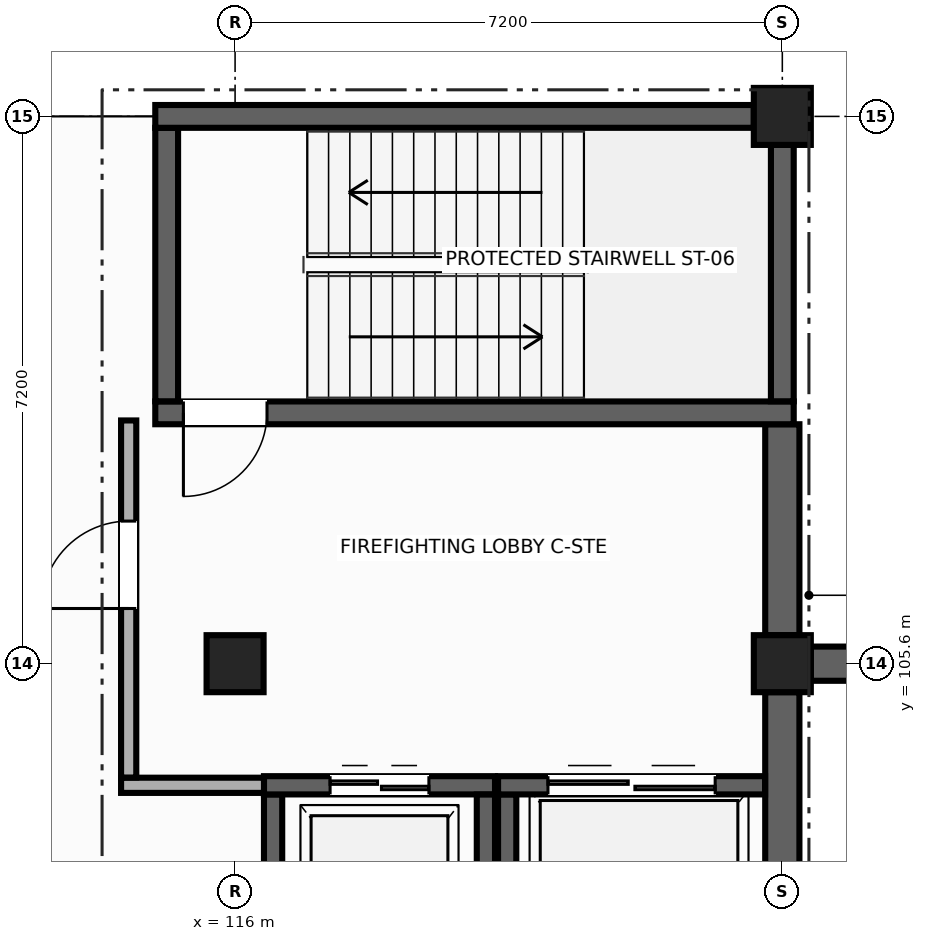
"""IFC4 building model, lengths in metres.
Left out: names, types, materials, properties, quantities, classifications, styles, units other than length and angle.
Written with IfcOpenShell. Run it as: python <this file> out.ifc"""

import sys

from ifc_helpers import new_model, si_unit, direction, frame, frame_2d, origin, origin_2d, place, context, subcontext, project, spatial, rectangle, extrude, element, fill, save


model = new_model("IFC4")
c1 = context("Model", 3, precision=1e-05, world=origin(), true_north=direction((0.0, 1.0)))
c2 = subcontext(c1, "Body", "Model", "MODEL_VIEW")
j1 = project(units=[si_unit("LENGTHUNIT", "METRE"), si_unit("PLANEANGLEUNIT", "RADIAN")], contexts=[c1])
p1 = place(None, origin())
s1 = spatial("IfcSite", under=j1, at=p1, CompositionType="ELEMENT")
p2 = place(p1, origin())
s2 = spatial("IfcBuilding", under=s1, at=p2, CompositionType="ELEMENT")
p3 = place(p2, frame((0.0, 0.0, -4.8)))
s3 = spatial("IfcBuildingStorey", under=s2, at=p3, CompositionType="ELEMENT", Elevation=-4.8)
p4 = place(p3, frame((116.0, 105.6, 0.0), z_axis=(0.0, 0.0, 1.0), x_axis=(0.0, 1.0, 0.0)))
e1 = element("IfcColumn", 1, at=p4, inside=s3, PredefinedType="COLUMN", context=c2, shape_type="SweptSolid", body=[
    extrude(rectangle(XDim=0.75, YDim=0.75, at=origin_2d()), origin(), (0.0, 0.0, 1.0), 4.42),
])
for number, where, z_axis, x_axis in (
    (2, (123.2, 105.6, 0.0), (0.0, 0.0, 1.0), (1.0, 0.0, 0.0)),
    (3, (123.2, 112.8, 0.0), (0.0, 0.0, 1.0), (1.0, 0.0, 0.0)),
):
    element("IfcColumn", number, at=place(p3, frame(where, z_axis=z_axis, x_axis=x_axis)), inside=s3, PredefinedType="COLUMN", context=c2, shape_type="SweptSolid", body=[
        extrude(rectangle(XDim=0.75, YDim=0.75, at=origin_2d()), origin(), (0.0, 0.0, 1.0), 4.8),
    ])
p5 = place(p3, frame((130.025, 105.6, 0.0), z_axis=(0.0, 0.0, 1.0), x_axis=(-1.0, 0.0, 0.0)))
e4 = element("IfcWall", 4, at=p5, inside=s3, PredefinedType="SHEAR", context=c2, shape_type="SweptSolid", body=[
    extrude(rectangle(XDim=6.45, YDim=0.45, at=frame_2d((3.225, 0.0))), origin(), (0.0, 0.0, 1.0), 4.55),
])
p6 = place(p3, frame((123.2, 105.225, 0.0), z_axis=(0.0, 0.0, 1.0), x_axis=(0.0, -1.0, 0.0)))
e5 = element("IfcWall", 5, at=p6, inside=s3, PredefinedType="SHEAR", context=c2, shape_type="SweptSolid", body=[
    extrude(rectangle(XDim=6.45, YDim=0.45, at=frame_2d((3.225, 0.0))), origin(), (0.0, 0.0, 1.0), 4.42),
])
p7 = place(p3, frame((123.2, 108.75, 0.0), z_axis=(0.0, 0.0, 1.0), x_axis=(0.0, -1.0, 0.0)))
e6 = element("IfcWall", 6, at=p7, inside=s3, PredefinedType="SHEAR", context=c2, shape_type="SweptSolid", body=[
    extrude(rectangle(XDim=2.775, YDim=0.45, at=frame_2d((1.387, 0.0))), origin(), (0.0, 0.0, 1.0), 4.42),
])
p8 = place(p3, frame((123.35, 108.9, 0.0), z_axis=(0.0, 0.0, 1.0), x_axis=(-1.0, 0.0, 0.0)))
e7 = element("IfcWall", 7, at=p8, inside=s3, PredefinedType="SHEAR", context=c2, shape_type="SweptSolid", body=[
    extrude(rectangle(XDim=8.4, YDim=0.3, at=frame_2d((4.2, 0.0))), origin(), (0.0, 0.0, 1.0), 4.42),
])
p9 = place(p8, frame((6.93, 0.0, 0.0)))
e8 = element("IfcOpeningElement", 8, at=p9, cuts=e7, PredefinedType="OPENING", context=c2, shape_type="SweptSolid", body=[
    extrude(rectangle(XDim=1.1, YDim=2.15, at=frame_2d((0.55, 1.075))), frame((0.0, 0.16, 0.0), z_axis=(0.0, -1.0, 0.0), x_axis=(1.0, 0.0, 0.0)), (0.0, 0.0, 1.0), 0.32),
])
p10 = place(p3, frame((115.1, 109.052, 0.0), z_axis=(0.0, 0.0, 1.0), x_axis=(0.0, 1.0, 0.0)))
e9 = element("IfcWall", 9, at=p10, inside=s3, PredefinedType="SHEAR", context=c2, shape_type="SweptSolid", body=[
    extrude(rectangle(XDim=3.598, YDim=0.3, at=frame_2d((1.799, 0.0))), origin(), (0.0, 0.0, 1.0), 4.42),
])
p11 = place(p3, frame((114.95, 112.8, 0.0), z_axis=(0.0, 0.0, 1.0), x_axis=(1.0, 0.0, 0.0)))
e10 = element("IfcWall", 10, at=p11, inside=s3, PredefinedType="SHEAR", context=c2, shape_type="SweptSolid", body=[
    extrude(rectangle(XDim=7.875, YDim=0.3, at=frame_2d((3.938, 0.0))), origin(), (0.0, 0.0, 1.0), 4.42),
])
p12 = place(p3, frame((123.2, 112.425, 0.0), z_axis=(0.0, 0.0, 1.0), x_axis=(0.0, -1.0, 0.0)))
e11 = element("IfcWall", 11, at=p12, inside=s3, PredefinedType="SHEAR", context=c2, shape_type="SweptSolid", body=[
    extrude(rectangle(XDim=3.373, YDim=0.3, at=frame_2d((1.687, 0.0))), origin(), (0.0, 0.0, 1.0), 4.42),
])
p13 = place(p3, frame((116.5, 100.922, 0.0), z_axis=(0.0, 0.0, 1.0), x_axis=(0.0, 1.0, 0.0)))
e12 = element("IfcWall", 12, at=p13, inside=s3, PredefinedType="SHEAR", context=c2, shape_type="SweptSolid", body=[
    extrude(rectangle(XDim=2.958, YDim=0.24, at=frame_2d((1.479, 0.0))), origin(), (0.0, 0.0, 1.0), 4.42),
])
p14 = place(p3, frame((116.38, 104.0, 0.0), z_axis=(0.0, 0.0, 1.0), x_axis=(1.0, 0.0, 0.0)))
e13 = element("IfcWall", 13, at=p14, inside=s3, PredefinedType="SHEAR", context=c2, shape_type="SweptSolid", body=[
    extrude(rectangle(XDim=3.04, YDim=0.24, at=frame_2d((1.52, 0.0))), origin(), (0.0, 0.0, 1.0), 4.42),
])
p15 = place(p14, frame((0.87, 0.0, 0.0)))
e14 = element("IfcOpeningElement", 14, at=p15, cuts=e13, PredefinedType="OPENING", context=c2, shape_type="SweptSolid", body=[
    extrude(rectangle(XDim=1.3, YDim=2.15, at=frame_2d((0.65, 1.075))), frame((0.0, 0.13, 0.0), z_axis=(0.0, -1.0, 0.0), x_axis=(1.0, 0.0, 0.0)), (0.0, 0.0, 1.0), 0.26),
])
p16 = place(p3, frame((119.3, 103.878, 0.0), z_axis=(0.0, 0.0, 1.0), x_axis=(0.0, -1.0, 0.0)))
e15 = element("IfcWall", 15, at=p16, inside=s3, PredefinedType="SHEAR", context=c2, shape_type="SweptSolid", body=[
    extrude(rectangle(XDim=2.956, YDim=0.24, at=frame_2d((1.478, 0.0))), origin(), (0.0, 0.0, 1.0), 4.42),
])
p17 = place(p3, frame((119.58, 100.322, 0.0), z_axis=(0.0, 0.0, 1.0), x_axis=(0.0, 1.0, 0.0)))
e16 = element("IfcWall", 16, at=p17, inside=s3, PredefinedType="SHEAR", context=c2, shape_type="SweptSolid", body=[
    extrude(rectangle(XDim=3.558, YDim=0.24, at=frame_2d((1.779, 0.0))), origin(), (0.0, 0.0, 1.0), 4.42),
])
p18 = place(p3, frame((119.46, 104.0, 0.0), z_axis=(0.0, 0.0, 1.0), x_axis=(1.0, 0.0, 0.0)))
e17 = element("IfcWall", 17, at=p18, inside=s3, PredefinedType="SHEAR", context=c2, shape_type="SweptSolid", body=[
    extrude(rectangle(XDim=3.513, YDim=0.24, at=frame_2d((1.756, 0.0))), origin(), (0.0, 0.0, 1.0), 4.42),
])
p19 = place(p18, frame((0.656, 0.0, 0.0)))
e18 = element("IfcOpeningElement", 18, at=p19, cuts=e17, PredefinedType="OPENING", context=c2, shape_type="SweptSolid", body=[
    extrude(rectangle(XDim=2.2, YDim=2.5, at=frame_2d((1.1, 1.25))), frame((0.0, 0.13, 0.0), z_axis=(0.0, -1.0, 0.0), x_axis=(1.0, 0.0, 0.0)), (0.0, 0.0, 1.0), 0.26),
])
p20 = place(p3, frame((116.38, 104.0, 0.0), z_axis=(0.0, 0.0, 1.0), x_axis=(-1.0, 0.0, 0.0)))
e19 = element("IfcWall", 19, at=p20, inside=s3, PredefinedType="PARTITIONING", context=c2, shape_type="SweptSolid", body=[
    extrude(rectangle(XDim=1.88, YDim=0.2, at=frame_2d((0.94, 0.0))), origin(), (0.0, 0.0, 1.0), 3.615),
])
p21 = place(p3, frame((114.6, 104.102, 0.0), z_axis=(0.0, 0.0, 1.0), x_axis=(0.0, 1.0, 0.0)))
e20 = element("IfcWall", 20, at=p21, inside=s3, PredefinedType="PARTITIONING", context=c2, shape_type="SweptSolid", body=[
    extrude(rectangle(XDim=4.698, YDim=0.2, at=frame_2d((2.349, 0.0))), origin(), (0.0, 0.0, 1.0), 3.015),
])
p22 = place(p21, frame((2.224, 0.0, 0.0)))
e21 = element("IfcOpeningElement", 21, at=p22, cuts=e20, PredefinedType="OPENING", context=c2, shape_type="SweptSolid", body=[
    extrude(rectangle(XDim=1.15, YDim=2.15, at=frame_2d((0.575, 1.075))), frame((0.0, 0.11, 0.0), z_axis=(0.0, -1.0, 0.0), x_axis=(1.0, 0.0, 0.0)), (0.0, 0.0, 1.0), 0.22),
])
p23 = place(p9, origin())
e22 = element("IfcDoor", 22, at=p23, inside=s3, OperationType="SINGLE_SWING_RIGHT", PredefinedType="DOOR", context=c2, shape_type="SweptSolid", body=[
    extrude(rectangle(XDim=1.1, YDim=2.15, at=frame_2d((0.55, 1.075))), frame((0.0, 0.025, 0.0), z_axis=(0.0, -1.0, 0.0), x_axis=(1.0, 0.0, 0.0)), (0.0, 0.0, 1.0), 0.05),
])
fill(e8, e22)
p24 = place(p15, origin())
e23 = element("IfcDoor", 23, at=p24, inside=s3, OperationType="DOUBLE_DOOR_SLIDING", PredefinedType="DOOR", context=c2, shape_type="SweptSolid", body=[
    extrude(rectangle(XDim=1.3, YDim=2.15, at=frame_2d((0.65, 1.075))), frame((0.0, 0.025, 0.0), z_axis=(0.0, -1.0, 0.0), x_axis=(1.0, 0.0, 0.0)), (0.0, 0.0, 1.0), 0.05),
])
fill(e14, e23)
p25 = place(p19, origin())
e24 = element("IfcDoor", 24, at=p25, inside=s3, OperationType="DOUBLE_DOOR_SLIDING", PredefinedType="DOOR", context=c2, shape_type="SweptSolid", body=[
    extrude(rectangle(XDim=2.2, YDim=2.5, at=frame_2d((1.1, 1.25))), frame((0.0, 0.025, 0.0), z_axis=(0.0, -1.0, 0.0), x_axis=(1.0, 0.0, 0.0)), (0.0, 0.0, 1.0), 0.05),
])
fill(e18, e24)
p26 = place(p22, origin())
e25 = element("IfcDoor", 25, at=p26, inside=s3, OperationType="SINGLE_SWING_LEFT", PredefinedType="DOOR", context=c2, shape_type="SweptSolid", body=[
    extrude(rectangle(XDim=1.15, YDim=2.15, at=frame_2d((0.575, 1.075))), frame((0.0, 0.025, 0.0), z_axis=(0.0, -1.0, 0.0), x_axis=(1.0, 0.0, 0.0)), (0.0, 0.0, 1.0), 0.05),
])
fill(e21, e25)
save(model, sys.argv[1])
